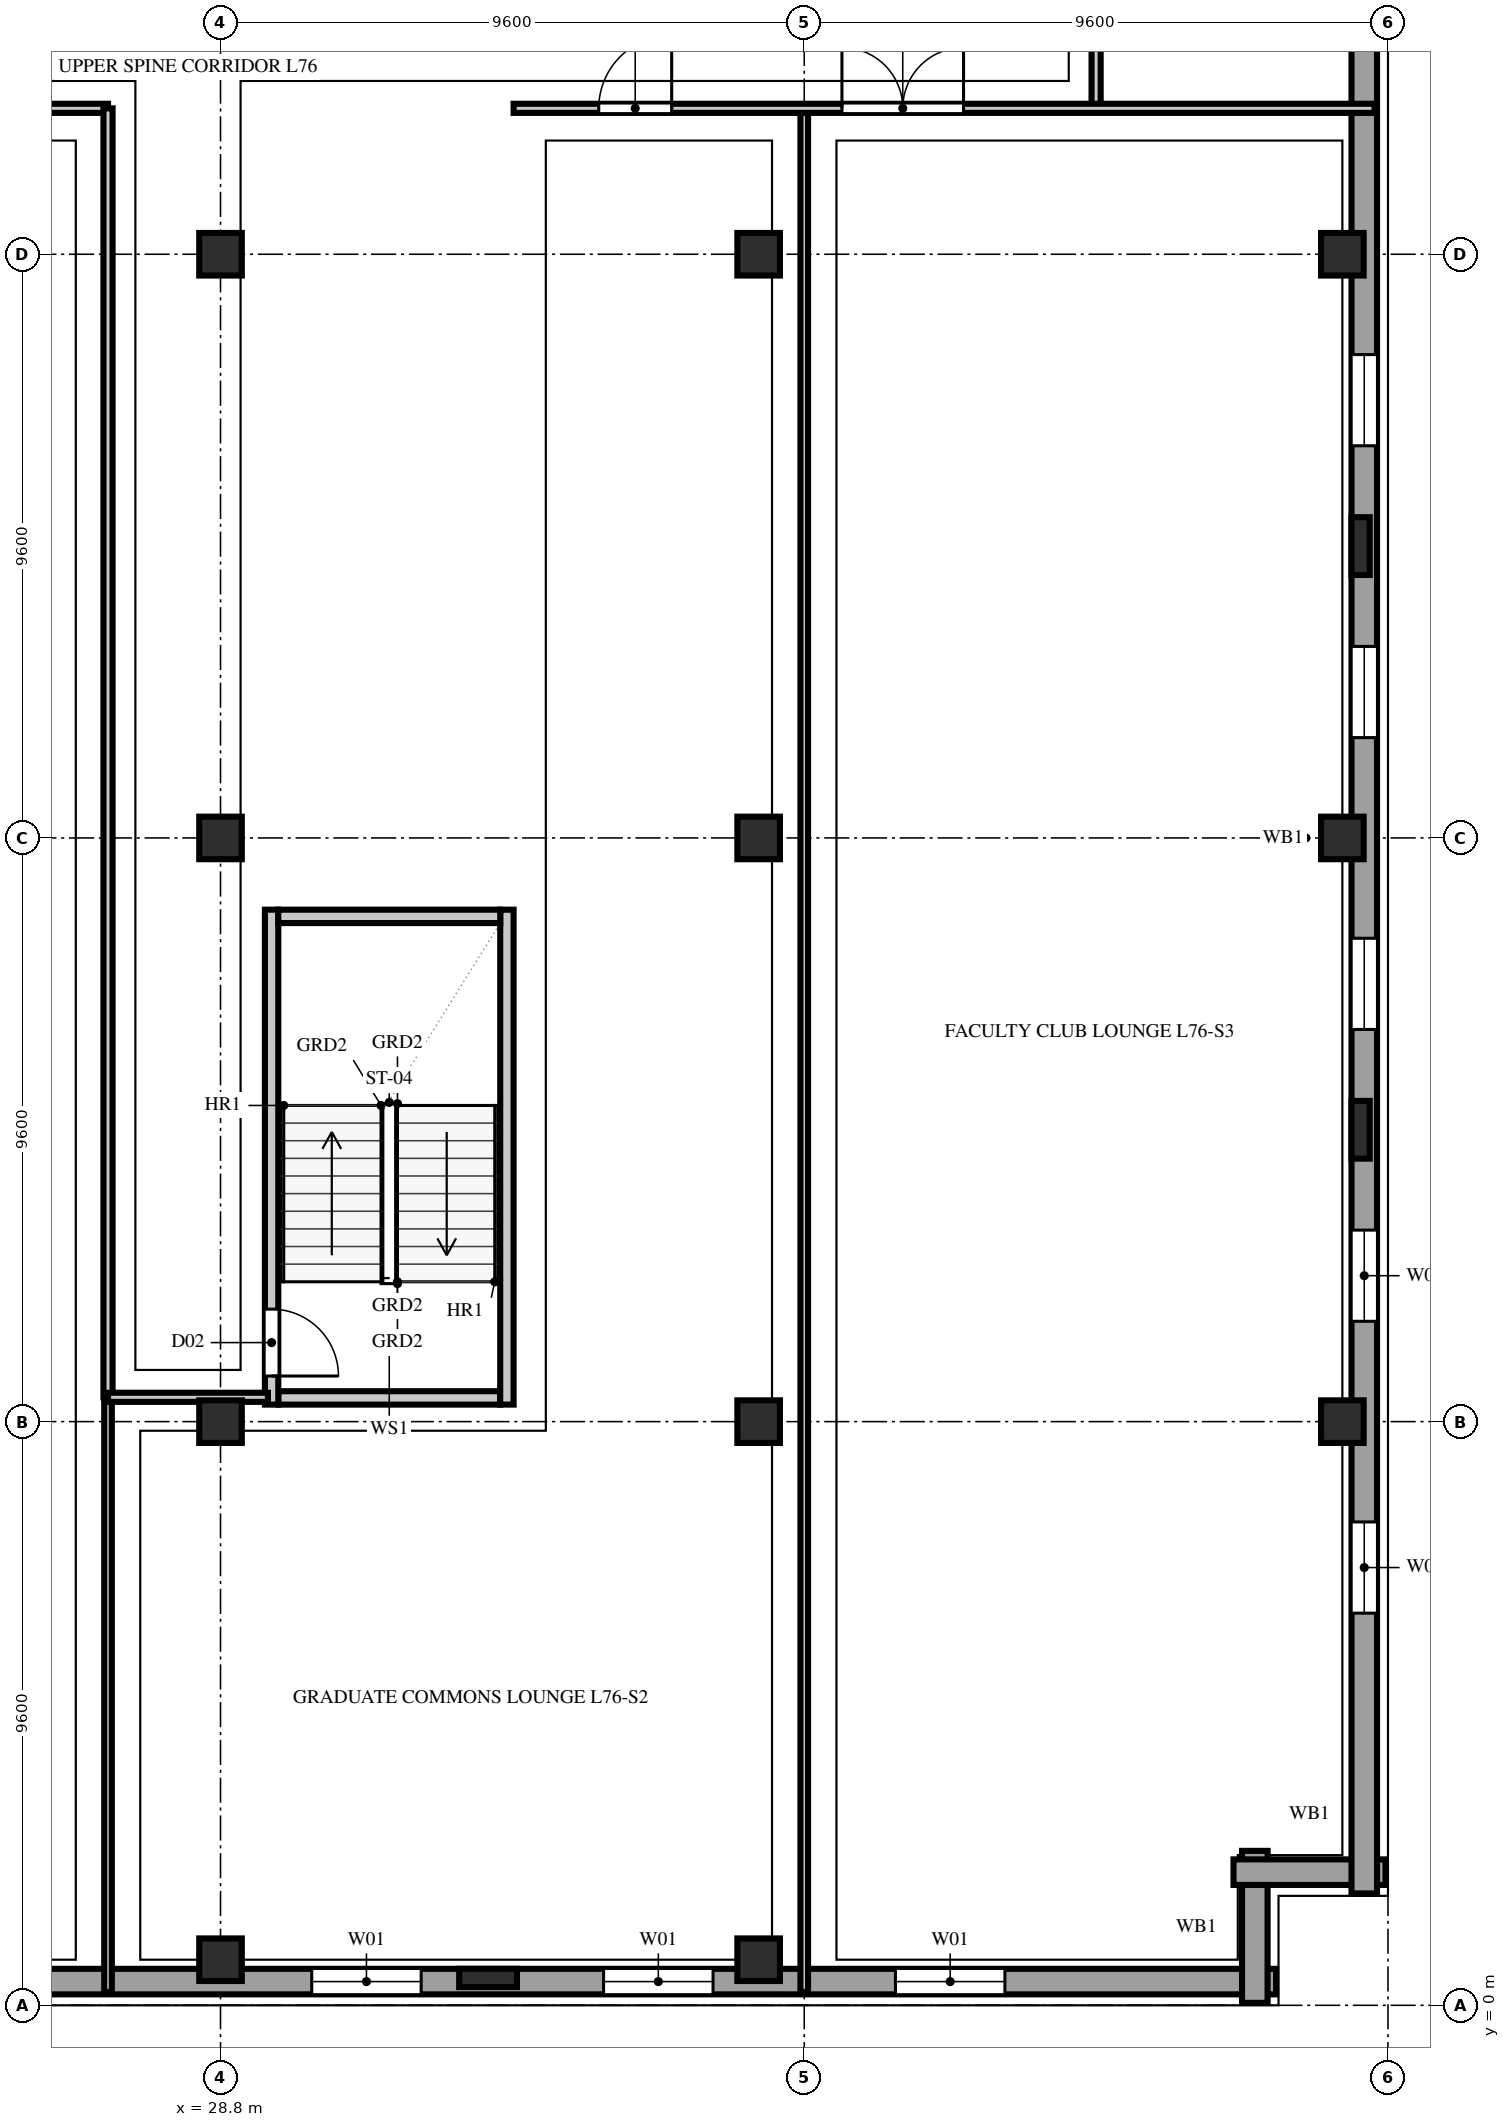
"""IFC4 building model, lengths in metres.
Left out: names, types, materials, properties, quantities, classifications, styles, units other than length and angle.
Written with IfcOpenShell. Run it as: python <this file> out.ifc"""

import sys

from ifc_helpers import new_model, si_unit, direction, frame, frame_2d, origin, origin_2d, place, context, subcontext, project, spatial, rectangle, extrude, element, fill, save


model = new_model("IFC4")
c1 = context("Model", 3, precision=1e-05, world=origin(), true_north=direction((0.0, 1.0)))
c2 = subcontext(c1, "Body", "Model", "MODEL_VIEW")
j1 = project(units=[si_unit("LENGTHUNIT", "METRE"), si_unit("PLANEANGLEUNIT", "RADIAN")], contexts=[c1])
p1 = place(None, origin())
s1 = spatial("IfcSite", under=j1, at=p1, CompositionType="ELEMENT")
p2 = place(p1, origin())
s2 = spatial("IfcBuilding", under=s1, at=p2, CompositionType="ELEMENT")
p3 = place(p2, frame((0.0, 0.0, 300.0)))
s3 = spatial("IfcBuildingStorey", under=s2, at=p3, CompositionType="ELEMENT", Elevation=300.0)
for number, where, z_axis, x_axis in (
    (1, (28.8, 0.75, 0.0), (0.0, 0.0, 1.0), (1.0, 0.0, 0.0)),
    (2, (28.8, 9.6, 0.0), (0.0, 0.0, 1.0), (1.0, 0.0, 0.0)),
    (3, (28.8, 19.2, 0.0), (0.0, 0.0, 1.0), (1.0, 0.0, 0.0)),
    (4, (28.8, 28.8, 0.0), (0.0, 0.0, 1.0), (1.0, 0.0, 0.0)),
    (5, (37.65, 0.75, 0.0), (0.0, 0.0, 1.0), (1.0, 0.0, 0.0)),
    (6, (37.65, 9.6, 0.0), (0.0, 0.0, 1.0), (1.0, 0.0, 0.0)),
    (7, (37.65, 19.2, 0.0), (0.0, 0.0, 1.0), (1.0, 0.0, 0.0)),
    (8, (37.65, 28.8, 0.0), (0.0, 0.0, 1.0), (1.0, 0.0, 0.0)),
    (9, (47.25, 9.6, 0.0), (0.0, 0.0, 1.0), (1.0, 0.0, 0.0)),
    (10, (47.25, 19.2, 0.0), (0.0, 0.0, 1.0), (1.0, 0.0, 0.0)),
    (11, (47.25, 28.8, 0.0), (0.0, 0.0, 1.0), (1.0, 0.0, 0.0)),
):
    element("IfcColumn", number, at=place(p3, frame(where, z_axis=z_axis, x_axis=x_axis)), inside=s3, PredefinedType="COLUMN", context=c2, shape_type="SweptSolid", body=[
        extrude(rectangle(XDim=0.7, YDim=0.7, at=origin_2d()), origin(), (0.0, 0.0, 1.0), 3.8),
    ])
for number, where, z_axis, x_axis in (
    (12, (33.2, 0.45, 0.0), (0.0, 0.0, 1.0), (1.0, 0.0, 0.0)),
    (13, (47.55, 14.4, 0.0), (0.0, 0.0, 1.0), (0.0, 1.0, 0.0)),
    (14, (47.55, 24.0, 0.0), (0.0, 0.0, 1.0), (0.0, 1.0, 0.0)),
):
    element("IfcColumn", number, at=place(p3, frame(where, z_axis=z_axis, x_axis=x_axis)), inside=s3, PredefinedType="PILASTER", context=c2, shape_type="SweptSolid", body=[
        extrude(rectangle(XDim=0.95, YDim=0.3, at=origin_2d()), origin(), (0.0, 0.0, 1.0), 3.8),
    ])
p4 = place(p3, frame((1.84, 0.39, 0.0), z_axis=(0.0, 0.0, 1.0), x_axis=(1.0, 0.0, 0.0)))
e15 = element("IfcWall", 15, at=p4, inside=s3, PredefinedType="SOLIDWALL", context=c2, shape_type="SweptSolid", body=[
    extrude(rectangle(XDim=44.32, YDim=0.42, at=frame_2d((22.16, 0.0))), origin(), (0.0, 0.0, 1.0), 3.54),
])
p5 = place(p4, frame((4.46, 0.0, 0.85)))
e16 = element("IfcOpeningElement", 16, at=p5, cuts=e15, PredefinedType="OPENING", context=c2, shape_type="SweptSolid", body=[
    extrude(rectangle(XDim=1.8, YDim=1.85, at=frame_2d((0.9, 0.925))), frame((0.0, 0.222, 0.0), z_axis=(0.0, -1.0, 0.0), x_axis=(1.0, 0.0, 0.0)), (0.0, 0.0, 1.0), 0.444),
])
p6 = place(p4, frame((9.26, 0.0, 0.85)))
e17 = element("IfcOpeningElement", 17, at=p6, cuts=e15, PredefinedType="OPENING", context=c2, shape_type="SweptSolid", body=[
    extrude(rectangle(XDim=1.8, YDim=1.85, at=frame_2d((0.9, 0.925))), frame((0.0, 0.222, 0.0), z_axis=(0.0, -1.0, 0.0), x_axis=(1.0, 0.0, 0.0)), (0.0, 0.0, 1.0), 0.444),
])
p7 = place(p4, frame((18.86, 0.0, 0.85)))
e18 = element("IfcOpeningElement", 18, at=p7, cuts=e15, PredefinedType="OPENING", context=c2, shape_type="SweptSolid", body=[
    extrude(rectangle(XDim=1.8, YDim=1.85, at=frame_2d((0.9, 0.925))), frame((0.0, 0.222, 0.0), z_axis=(0.0, -1.0, 0.0), x_axis=(1.0, 0.0, 0.0)), (0.0, 0.0, 1.0), 0.444),
])
p8 = place(p4, frame((28.46, 0.0, 0.85)))
e19 = element("IfcOpeningElement", 19, at=p8, cuts=e15, PredefinedType="OPENING", context=c2, shape_type="SweptSolid", body=[
    extrude(rectangle(XDim=1.8, YDim=1.85, at=frame_2d((0.9, 0.925))), frame((0.0, 0.222, 0.0), z_axis=(0.0, -1.0, 0.0), x_axis=(1.0, 0.0, 0.0)), (0.0, 0.0, 1.0), 0.444),
])
p9 = place(p4, frame((33.26, 0.0, 0.85)))
e20 = element("IfcOpeningElement", 20, at=p9, cuts=e15, PredefinedType="OPENING", context=c2, shape_type="SweptSolid", body=[
    extrude(rectangle(XDim=1.8, YDim=1.85, at=frame_2d((0.9, 0.925))), frame((0.0, 0.222, 0.0), z_axis=(0.0, -1.0, 0.0), x_axis=(1.0, 0.0, 0.0)), (0.0, 0.0, 1.0), 0.444),
])
p10 = place(p4, frame((38.06, 0.0, 0.85)))
e21 = element("IfcOpeningElement", 21, at=p10, cuts=e15, PredefinedType="OPENING", context=c2, shape_type="SweptSolid", body=[
    extrude(rectangle(XDim=1.8, YDim=1.85, at=frame_2d((0.9, 0.925))), frame((0.0, 0.222, 0.0), z_axis=(0.0, -1.0, 0.0), x_axis=(1.0, 0.0, 0.0)), (0.0, 0.0, 1.0), 0.444),
])
for number, where, z_axis, x_axis in (
    (22, (45.81, 0.04, 0.0), (0.0, 0.0, 1.0), (0.0, 1.0, 0.0)),
    (23, (45.46, 2.19, 0.0), (0.0, 0.0, 1.0), (1.0, 0.0, 0.0)),
):
    element("IfcWall", number, at=place(p3, frame(where, z_axis=z_axis, x_axis=x_axis)), inside=s3, PredefinedType="SOLIDWALL", context=c2, shape_type="SweptSolid", body=[
        extrude(rectangle(XDim=2.5, YDim=0.42, at=frame_2d((1.25, 0.0))), origin(), (0.0, 0.0, 1.0), 3.54),
    ])
p11 = place(p3, frame((47.61, 1.84, 0.0), z_axis=(0.0, 0.0, 1.0), x_axis=(0.0, 1.0, 0.0)))
e24 = element("IfcWall", 24, at=p11, inside=s3, PredefinedType="SOLIDWALL", context=c2, shape_type="SweptSolid", body=[
    extrude(rectangle(XDim=34.72, YDim=0.42, at=frame_2d((17.36, 0.0))), origin(), (0.0, 0.0, 1.0), 3.54),
])
p12 = place(p11, frame((4.61, 0.0, 0.85)))
e25 = element("IfcOpeningElement", 25, at=p12, cuts=e24, PredefinedType="OPENING", context=c2, shape_type="SweptSolid", body=[
    extrude(rectangle(XDim=1.5, YDim=1.85, at=frame_2d((0.75, 0.925))), frame((0.0, 0.222, 0.0), z_axis=(0.0, -1.0, 0.0), x_axis=(1.0, 0.0, 0.0)), (0.0, 0.0, 1.0), 0.444),
])
p13 = place(p11, frame((9.41, 0.0, 0.85)))
e26 = element("IfcOpeningElement", 26, at=p13, cuts=e24, PredefinedType="OPENING", context=c2, shape_type="SweptSolid", body=[
    extrude(rectangle(XDim=1.5, YDim=1.85, at=frame_2d((0.75, 0.925))), frame((0.0, 0.222, 0.0), z_axis=(0.0, -1.0, 0.0), x_axis=(1.0, 0.0, 0.0)), (0.0, 0.0, 1.0), 0.444),
])
p14 = place(p11, frame((14.21, 0.0, 0.85)))
e27 = element("IfcOpeningElement", 27, at=p14, cuts=e24, PredefinedType="OPENING", context=c2, shape_type="SweptSolid", body=[
    extrude(rectangle(XDim=1.5, YDim=1.85, at=frame_2d((0.75, 0.925))), frame((0.0, 0.222, 0.0), z_axis=(0.0, -1.0, 0.0), x_axis=(1.0, 0.0, 0.0)), (0.0, 0.0, 1.0), 0.444),
])
p15 = place(p11, frame((19.01, 0.0, 0.85)))
e28 = element("IfcOpeningElement", 28, at=p15, cuts=e24, PredefinedType="OPENING", context=c2, shape_type="SweptSolid", body=[
    extrude(rectangle(XDim=1.5, YDim=1.85, at=frame_2d((0.75, 0.925))), frame((0.0, 0.222, 0.0), z_axis=(0.0, -1.0, 0.0), x_axis=(1.0, 0.0, 0.0)), (0.0, 0.0, 1.0), 0.444),
])
p16 = place(p11, frame((23.81, 0.0, 0.85)))
e29 = element("IfcOpeningElement", 29, at=p16, cuts=e24, PredefinedType="OPENING", context=c2, shape_type="SweptSolid", body=[
    extrude(rectangle(XDim=1.5, YDim=1.85, at=frame_2d((0.75, 0.925))), frame((0.0, 0.222, 0.0), z_axis=(0.0, -1.0, 0.0), x_axis=(1.0, 0.0, 0.0)), (0.0, 0.0, 1.0), 0.444),
])
p17 = place(p3, frame((29.75, 9.99, 0.0), z_axis=(0.0, 0.0, 1.0), x_axis=(1.0, 0.0, 0.0)))
e30 = element("IfcWall", 30, at=p17, inside=s3, PredefinedType="SOLIDWALL", context=c2, shape_type="SweptSolid", body=[
    extrude(rectangle(XDim=3.65, YDim=0.22, at=frame_2d((1.825, 0.0))), origin(), (0.0, 0.0, 1.0), 3.54),
])
p18 = place(p3, frame((29.64, 9.88, 0.0), z_axis=(0.0, 0.0, 1.0), x_axis=(0.0, 1.0, 0.0)))
e31 = element("IfcWall", 31, at=p18, inside=s3, PredefinedType="SOLIDWALL", context=c2, shape_type="SweptSolid", body=[
    extrude(rectangle(XDim=8.14, YDim=0.22, at=frame_2d((4.07, 0.0))), origin(), (0.0, 0.0, 1.0), 3.54),
])
p19 = place(p18, frame((0.47, 0.0, 0.0)))
e32 = element("IfcOpeningElement", 32, at=p19, cuts=e31, PredefinedType="OPENING", context=c2, shape_type="SweptSolid", body=[
    extrude(rectangle(XDim=1.1, YDim=2.2, at=frame_2d((0.55, 1.1))), frame((0.0, 0.122, 0.0), z_axis=(0.0, -1.0, 0.0), x_axis=(1.0, 0.0, 0.0)), (0.0, 0.0, 1.0), 0.244),
])
p20 = place(p3, frame((33.51, 9.88, 0.0), z_axis=(0.0, 0.0, 1.0), x_axis=(0.0, 1.0, 0.0)))
e33 = element("IfcWall", 33, at=p20, inside=s3, PredefinedType="SOLIDWALL", context=c2, shape_type="SweptSolid", body=[
    extrude(rectangle(XDim=8.14, YDim=0.22, at=frame_2d((4.07, 0.0))), origin(), (0.0, 0.0, 1.0), 3.54),
])
p21 = place(p3, frame((29.75, 17.91, 0.0), z_axis=(0.0, 0.0, 1.0), x_axis=(1.0, 0.0, 0.0)))
e34 = element("IfcWall", 34, at=p21, inside=s3, PredefinedType="SOLIDWALL", context=c2, shape_type="SweptSolid", body=[
    extrude(rectangle(XDim=3.65, YDim=0.22, at=frame_2d((1.825, 0.0))), origin(), (0.0, 0.0, 1.0), 3.54),
])
p22 = place(p3, frame((43.2, 31.2, 0.0), z_axis=(0.0, 0.0, 1.0), x_axis=(0.0, 1.0, 0.0)))
e35 = element("IfcWall", 35, at=p22, inside=s3, PredefinedType="PARTITIONING", context=c2, shape_type="SweptSolid", body=[
    extrude(rectangle(XDim=2.1, YDim=0.15, at=frame_2d((1.05, 0.0))), origin(), (0.0, 0.0, 1.0), 3.54),
])
p23 = place(p3, frame((19.2, 31.2, 0.0), z_axis=(0.0, 0.0, 1.0), x_axis=(1.0, 0.0, 0.0)))
e36 = element("IfcWall", 36, at=p23, inside=s3, PredefinedType="PARTITIONING", context=c2, shape_type="SweptSolid", body=[
    extrude(rectangle(XDim=7.75, YDim=0.15, at=frame_2d((3.875, 0.0))), origin(), (0.0, 0.0, 1.0), 3.54),
])
p24 = place(p23, frame((2.8, 0.0, 0.0)))
e37 = element("IfcOpeningElement", 37, at=p24, cuts=e36, PredefinedType="OPENING", context=c2, shape_type="SweptSolid", body=[
    extrude(rectangle(XDim=1.2, YDim=2.2, at=frame_2d((0.6, 1.1))), frame((0.0, 0.087, 0.0), z_axis=(0.0, -1.0, 0.0), x_axis=(1.0, 0.0, 0.0)), (0.0, 0.0, 1.0), 0.174),
])
p25 = place(p3, frame((26.95, 0.22, 0.0), z_axis=(0.0, 0.0, 1.0), x_axis=(0.0, 1.0, 0.0)))
e38 = element("IfcWall", 38, at=p25, inside=s3, PredefinedType="PARTITIONING", context=c2, shape_type="SweptSolid", body=[
    extrude(rectangle(XDim=9.78, YDim=0.125, at=frame_2d((4.89, 0.0))), origin(), (0.0, 0.0, 1.0), 3.54),
])
p26 = place(p3, frame((26.95, 10.0, 0.0), z_axis=(0.0, 0.0, 1.0), x_axis=(0.0, 1.0, 0.0)))
e39 = element("IfcWall", 39, at=p26, inside=s3, PredefinedType="PARTITIONING", context=c2, shape_type="SweptSolid", body=[
    extrude(rectangle(XDim=21.2, YDim=0.15, at=frame_2d((10.6, 0.0))), origin(), (0.0, 0.0, 1.0), 3.54),
])
p27 = place(p3, frame((26.95, 10.0, 0.0), z_axis=(0.0, 0.0, 1.0), x_axis=(1.0, 0.0, 0.0)))
e40 = element("IfcWall", 40, at=p27, inside=s3, PredefinedType="PARTITIONING", context=c2, shape_type="SweptSolid", body=[
    extrude(rectangle(XDim=2.63, YDim=0.15, at=frame_2d((1.315, 0.0))), origin(), (0.0, 0.0, 1.0), 3.54),
])
p28 = place(p3, frame((38.4, 0.22, 0.0), z_axis=(0.0, 0.0, 1.0), x_axis=(0.0, 1.0, 0.0)))
e41 = element("IfcWall", 41, at=p28, inside=s3, PredefinedType="PARTITIONING", context=c2, shape_type="SweptSolid", body=[
    extrude(rectangle(XDim=30.98, YDim=0.125, at=frame_2d((15.49, 0.0))), origin(), (0.0, 0.0, 1.0), 3.54),
])
p29 = place(p3, frame((33.62, 31.2, 0.0), z_axis=(0.0, 0.0, 1.0), x_axis=(1.0, 0.0, 0.0)))
e42 = element("IfcWall", 42, at=p29, inside=s3, PredefinedType="PARTITIONING", context=c2, shape_type="SweptSolid", body=[
    extrude(rectangle(XDim=14.16, YDim=0.15, at=frame_2d((7.08, 0.0))), origin(), (0.0, 0.0, 1.0), 3.54),
])
p30 = place(p29, frame((1.4, 0.0, 0.0)))
e43 = element("IfcOpeningElement", 43, at=p30, cuts=e42, PredefinedType="OPENING", context=c2, shape_type="SweptSolid", body=[
    extrude(rectangle(XDim=1.2, YDim=2.2, at=frame_2d((0.6, 1.1))), frame((0.0, 0.087, 0.0), z_axis=(0.0, -1.0, 0.0), x_axis=(1.0, 0.0, 0.0)), (0.0, 0.0, 1.0), 0.174),
])
p31 = place(p29, frame((5.4, 0.0, 0.0)))
e44 = element("IfcOpeningElement", 44, at=p31, cuts=e42, PredefinedType="OPENING", context=c2, shape_type="SweptSolid", body=[
    extrude(rectangle(XDim=2.0, YDim=2.3, at=frame_2d((1.0, 1.15))), frame((0.0, 0.087, 0.0), z_axis=(0.0, -1.0, 0.0), x_axis=(1.0, 0.0, 0.0)), (0.0, 0.0, 1.0), 0.174),
])
p32 = place(p8, origin())
e45 = element("IfcWindow", 45, at=p32, inside=s3, PartitioningType="DOUBLE_PANEL_VERTICAL", PredefinedType="WINDOW", context=c2, shape_type="SweptSolid", body=[
    extrude(rectangle(XDim=1.8, YDim=1.85, at=frame_2d((0.9, 0.925))), frame((0.0, 0.11, 0.0), z_axis=(0.0, -1.0, 0.0), x_axis=(1.0, 0.0, 0.0)), (0.0, 0.0, 1.0), 0.06),
])
fill(e19, e45)
p33 = place(p9, origin())
e46 = element("IfcWindow", 46, at=p33, inside=s3, PartitioningType="DOUBLE_PANEL_VERTICAL", PredefinedType="WINDOW", context=c2, shape_type="SweptSolid", body=[
    extrude(rectangle(XDim=1.8, YDim=1.85, at=frame_2d((0.9, 0.925))), frame((0.0, 0.11, 0.0), z_axis=(0.0, -1.0, 0.0), x_axis=(1.0, 0.0, 0.0)), (0.0, 0.0, 1.0), 0.06),
])
fill(e20, e46)
p34 = place(p10, origin())
e47 = element("IfcWindow", 47, at=p34, inside=s3, PartitioningType="DOUBLE_PANEL_VERTICAL", PredefinedType="WINDOW", context=c2, shape_type="SweptSolid", body=[
    extrude(rectangle(XDim=1.8, YDim=1.85, at=frame_2d((0.9, 0.925))), frame((0.0, 0.11, 0.0), z_axis=(0.0, -1.0, 0.0), x_axis=(1.0, 0.0, 0.0)), (0.0, 0.0, 1.0), 0.06),
])
fill(e21, e47)
p35 = place(p12, origin())
e48 = element("IfcWindow", 48, at=p35, inside=s3, PartitioningType="DOUBLE_PANEL_VERTICAL", PredefinedType="WINDOW", context=c2, shape_type="SweptSolid", body=[
    extrude(rectangle(XDim=1.5, YDim=1.85, at=frame_2d((0.75, 0.925))), frame((0.0, 0.11, 0.0), z_axis=(0.0, -1.0, 0.0), x_axis=(1.0, 0.0, 0.0)), (0.0, 0.0, 1.0), 0.06),
])
fill(e25, e48)
p36 = place(p13, origin())
e49 = element("IfcWindow", 49, at=p36, inside=s3, PartitioningType="DOUBLE_PANEL_VERTICAL", PredefinedType="WINDOW", context=c2, shape_type="SweptSolid", body=[
    extrude(rectangle(XDim=1.5, YDim=1.85, at=frame_2d((0.75, 0.925))), frame((0.0, 0.11, 0.0), z_axis=(0.0, -1.0, 0.0), x_axis=(1.0, 0.0, 0.0)), (0.0, 0.0, 1.0), 0.06),
])
fill(e26, e49)
p37 = place(p14, origin())
e50 = element("IfcWindow", 50, at=p37, inside=s3, PartitioningType="DOUBLE_PANEL_VERTICAL", PredefinedType="WINDOW", context=c2, shape_type="SweptSolid", body=[
    extrude(rectangle(XDim=1.5, YDim=1.85, at=frame_2d((0.75, 0.925))), frame((0.0, 0.11, 0.0), z_axis=(0.0, -1.0, 0.0), x_axis=(1.0, 0.0, 0.0)), (0.0, 0.0, 1.0), 0.06),
])
fill(e27, e50)
p38 = place(p15, origin())
e51 = element("IfcWindow", 51, at=p38, inside=s3, PartitioningType="DOUBLE_PANEL_VERTICAL", PredefinedType="WINDOW", context=c2, shape_type="SweptSolid", body=[
    extrude(rectangle(XDim=1.5, YDim=1.85, at=frame_2d((0.75, 0.925))), frame((0.0, 0.11, 0.0), z_axis=(0.0, -1.0, 0.0), x_axis=(1.0, 0.0, 0.0)), (0.0, 0.0, 1.0), 0.06),
])
fill(e28, e51)
p39 = place(p16, origin())
e52 = element("IfcWindow", 52, at=p39, inside=s3, PartitioningType="DOUBLE_PANEL_VERTICAL", PredefinedType="WINDOW", context=c2, shape_type="SweptSolid", body=[
    extrude(rectangle(XDim=1.5, YDim=1.85, at=frame_2d((0.75, 0.925))), frame((0.0, 0.11, 0.0), z_axis=(0.0, -1.0, 0.0), x_axis=(1.0, 0.0, 0.0)), (0.0, 0.0, 1.0), 0.06),
])
fill(e29, e52)
p40 = place(p19, frame((1.1, 0.0, 0.0), z_axis=(0.0, 0.0, 1.0), x_axis=(-1.0, 0.0, 0.0)))
e53 = element("IfcDoor", 53, at=p40, inside=s3, OperationType="SINGLE_SWING_RIGHT", PredefinedType="DOOR", context=c2, shape_type="SweptSolid", body=[
    extrude(rectangle(XDim=1.1, YDim=2.2, at=frame_2d((0.55, 1.1))), frame((0.0, 0.025, 0.0), z_axis=(0.0, -1.0, 0.0), x_axis=(1.0, 0.0, 0.0)), (0.0, 0.0, 1.0), 0.05),
])
fill(e32, e53)
p41 = place(p30, origin())
e54 = element("IfcDoor", 54, at=p41, inside=s3, OperationType="SINGLE_SWING_RIGHT", PredefinedType="DOOR", context=c2, shape_type="SweptSolid", body=[
    extrude(rectangle(XDim=1.2, YDim=2.2, at=frame_2d((0.6, 1.1))), frame((0.0, 0.025, 0.0), z_axis=(0.0, -1.0, 0.0), x_axis=(1.0, 0.0, 0.0)), (0.0, 0.0, 1.0), 0.05),
])
fill(e43, e54)
p42 = place(p31, origin())
e55 = element("IfcDoor", 55, at=p42, inside=s3, OperationType="DOUBLE_SWING_LEFT", PredefinedType="DOOR", context=c2, shape_type="SweptSolid", body=[
    extrude(rectangle(XDim=2.0, YDim=2.3, at=frame_2d((1.0, 1.15))), frame((0.0, 0.025, 0.0), z_axis=(0.0, -1.0, 0.0), x_axis=(1.0, 0.0, 0.0)), (0.0, 0.0, 1.0), 0.05),
])
fill(e44, e55)
save(model, sys.argv[1])
